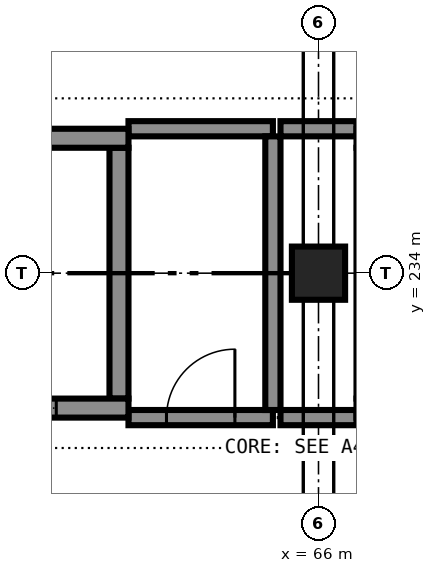
"""IFC4 building model, lengths in metres.
Left out: names, types, materials, properties, quantities, classifications, styles, units other than length and angle.
Written with IfcOpenShell. Run it as: python <this file> out.ifc"""

import sys

from ifc_helpers import new_model, si_unit, direction, frame, frame_2d, origin, origin_2d, place, context, subcontext, project, spatial, rectangle, extrude, element, fill, save


model = new_model("IFC4")
c1 = context("Model", 3, precision=1e-05, world=origin(), true_north=direction((0.0, 1.0)))
c2 = subcontext(c1, "Body", "Model", "MODEL_VIEW")
j1 = project(units=[si_unit("LENGTHUNIT", "METRE"), si_unit("PLANEANGLEUNIT", "RADIAN")], contexts=[c1])
p1 = place(None, origin())
s1 = spatial("IfcSite", under=j1, at=p1, CompositionType="ELEMENT")
p2 = place(p1, origin())
s2 = spatial("IfcBuilding", under=s1, at=p2, CompositionType="ELEMENT")
p3 = place(p2, frame((0.0, 0.0, 67.8)))
s3 = spatial("IfcBuildingStorey", under=s2, at=p3, CompositionType="ELEMENT", Elevation=67.8)
p4 = place(p3, frame((66.0, 234.0, 0.0), z_axis=(0.0, 0.0, 1.0), x_axis=(1.0, 0.0, 0.0)))
e1 = element("IfcColumn", 1, at=p4, inside=s3, PredefinedType="COLUMN", context=c2, shape_type="SweptSolid", body=[
    extrude(rectangle(XDim=0.7, YDim=0.7, at=origin_2d()), origin(), (0.0, 0.0, 1.0), 3.6),
])
p5 = place(p3, frame((60.5, 232.225, 0.0), z_axis=(0.0, 0.0, 1.0), x_axis=(1.0, 0.0, 0.0)))
e2 = element("IfcWall", 2, at=p5, inside=s3, PredefinedType="SHEAR", context=c2, shape_type="SweptSolid", body=[
    extrude(rectangle(XDim=3.0, YDim=0.25, at=frame_2d((1.5, 0.0))), origin(), (0.0, 0.0, 1.0), 3.6),
])
p6 = place(p5, frame((0.95, 0.0, 0.0)))
e3 = element("IfcOpeningElement", 3, at=p6, cuts=e2, PredefinedType="OPENING", context=c2, shape_type="SweptSolid", body=[
    extrude(rectangle(XDim=1.1, YDim=2.1, at=frame_2d((0.55, 1.05))), frame((0.0, 0.135, 0.0), z_axis=(0.0, -1.0, 0.0), x_axis=(1.0, 0.0, 0.0)), (0.0, 0.0, 1.0), 0.27),
])
p7 = place(p3, frame((60.5, 235.775, 0.0), z_axis=(0.0, 0.0, 1.0), x_axis=(1.0, 0.0, 0.0)))
e4 = element("IfcWall", 4, at=p7, inside=s3, PredefinedType="SHEAR", context=c2, shape_type="SweptSolid", body=[
    extrude(rectangle(XDim=3.0, YDim=0.25, at=frame_2d((1.5, 0.0))), origin(), (0.0, 0.0, 1.0), 3.6),
])
p8 = place(p3, frame((63.375, 232.35, 0.0), z_axis=(0.0, 0.0, 1.0), x_axis=(0.0, 1.0, 0.0)))
e5 = element("IfcWall", 5, at=p8, inside=s3, PredefinedType="SHEAR", context=c2, shape_type="SweptSolid", body=[
    extrude(rectangle(XDim=3.3, YDim=0.25, at=frame_2d((1.65, 0.0))), origin(), (0.0, 0.0, 1.0), 3.6),
])
p9 = place(p3, frame((63.5, 232.1, 0.0), z_axis=(0.0, 0.0, 1.0), x_axis=(1.0, 0.0, 0.0)))
e6 = element("IfcWall", 6, at=p9, inside=s3, PredefinedType="PARTITIONING", context=c2, shape_type="SweptSolid", body=[
    extrude(rectangle(XDim=1.9, YDim=0.2, at=frame_2d((0.95, 0.0))), origin(), (0.0, 0.0, 1.0), 3.4),
])
p10 = place(p9, frame((0.5, 0.0, 0.0)))
e7 = element("IfcOpeningElement", 7, at=p10, cuts=e6, PredefinedType="OPENING", context=c2, shape_type="SweptSolid", body=[
    extrude(rectangle(XDim=0.9, YDim=2.1, at=frame_2d((0.45, 1.05))), frame((0.0, 0.11, 0.0), z_axis=(0.0, -1.0, 0.0), x_axis=(1.0, 0.0, 0.0)), (0.0, 0.0, 1.0), 0.22),
])
p11 = place(p3, frame((65.5, 232.1, 0.0), z_axis=(0.0, 0.0, 1.0), x_axis=(1.0, 0.0, 0.0)))
e8 = element("IfcWall", 8, at=p11, inside=s3, PredefinedType="PARTITIONING", context=c2, shape_type="SweptSolid", body=[
    extrude(rectangle(XDim=1.0, YDim=0.2, at=frame_2d((0.5, 0.0))), origin(), (0.0, 0.0, 1.0), 3.4),
])
p12 = place(p3, frame((63.5, 235.9, 0.0), z_axis=(0.0, 0.0, 1.0), x_axis=(1.0, 0.0, 0.0)))
e9 = element("IfcWall", 9, at=p12, inside=s3, PredefinedType="PARTITIONING", context=c2, shape_type="SweptSolid", body=[
    extrude(rectangle(XDim=1.9, YDim=0.2, at=frame_2d((0.95, 0.0))), origin(), (0.0, 0.0, 1.0), 3.4),
])
p13 = place(p3, frame((65.5, 235.9, 0.0), z_axis=(0.0, 0.0, 1.0), x_axis=(1.0, 0.0, 0.0)))
e10 = element("IfcWall", 10, at=p13, inside=s3, PredefinedType="PARTITIONING", context=c2, shape_type="SweptSolid", body=[
    extrude(rectangle(XDim=1.0, YDim=0.2, at=frame_2d((0.5, 0.0))), origin(), (0.0, 0.0, 1.0), 3.4),
])
p14 = place(p3, frame((65.4, 232.2, 0.0), z_axis=(0.0, 0.0, 1.0), x_axis=(0.0, 1.0, 0.0)))
e11 = element("IfcWall", 11, at=p14, inside=s3, PredefinedType="PARTITIONING", context=c2, shape_type="SweptSolid", body=[
    extrude(rectangle(XDim=3.6, YDim=0.2, at=frame_2d((1.8, 0.0))), origin(), (0.0, 0.0, 1.0), 3.4),
])
p15 = place(p10, origin())
e12 = element("IfcDoor", 12, at=p15, inside=s3, OperationType="SINGLE_SWING_RIGHT", PredefinedType="DOOR", context=c2, shape_type="SweptSolid", body=[
    extrude(rectangle(XDim=0.9, YDim=2.1, at=frame_2d((0.45, 1.05))), frame((0.0, 0.025, 0.0), z_axis=(0.0, -1.0, 0.0), x_axis=(1.0, 0.0, 0.0)), (0.0, 0.0, 1.0), 0.05),
])
fill(e7, e12)
p16 = place(p6, origin())
e13 = element("IfcDoor", 13, at=p16, inside=s3, OperationType="SLIDING_TO_LEFT", PredefinedType="DOOR", context=c2, shape_type="SweptSolid", body=[
    extrude(rectangle(XDim=1.1, YDim=2.1, at=frame_2d((0.55, 1.05))), frame((0.0, 0.025, 0.0), z_axis=(0.0, -1.0, 0.0), x_axis=(1.0, 0.0, 0.0)), (0.0, 0.0, 1.0), 0.05),
])
fill(e3, e13)
save(model, sys.argv[1])
